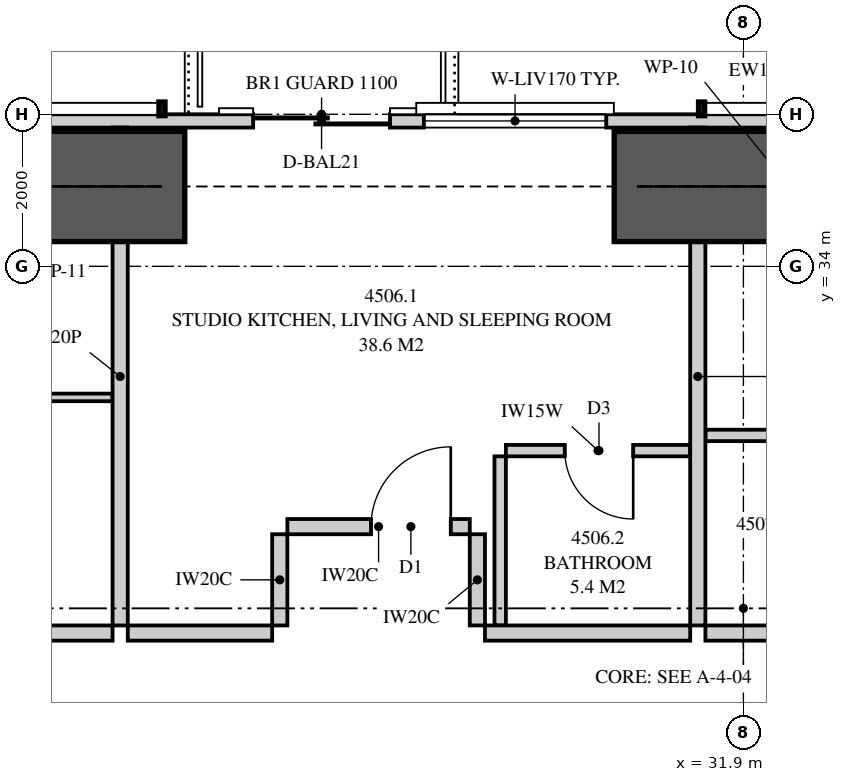
"""IFC4 building model, lengths in metres.
Left out: names, types, materials, properties, quantities, classifications, styles, units other than length and angle.
Written with IfcOpenShell. Run it as: python <this file> out.ifc"""

import sys

from ifc_helpers import new_model, si_unit, direction, frame, frame_2d, origin, place, context, subcontext, project, spatial, polyline, rectangle, outline, extrude, element, fill, save


model = new_model("IFC4")
c1 = context("Model", 3, precision=1e-05, world=origin(), true_north=direction((0.0, 1.0)))
c2 = subcontext(c1, "Body", "Model", "MODEL_VIEW")
j1 = project(units=[si_unit("LENGTHUNIT", "METRE"), si_unit("PLANEANGLEUNIT", "RADIAN")], contexts=[c1])
p1 = place(None, origin())
s1 = spatial("IfcSite", under=j1, at=p1, CompositionType="ELEMENT")
p2 = place(p1, origin())
s2 = spatial("IfcBuilding", under=s1, at=p2, CompositionType="ELEMENT")
p3 = place(p2, frame((0.0, 0.0, 167.75)))
s3 = spatial("IfcBuildingStorey", under=s2, at=p3, CompositionType="ELEMENT", Elevation=167.75)
p4 = place(p3, frame((49.949, 35.913, 0.0), z_axis=(0.0, 0.0, 1.0), x_axis=(-1.0, 0.0, 0.0)))
e1 = element("IfcWall", 1, at=p4, inside=s3, PredefinedType="SOLIDWALL", context=c2, shape_type="SweptSolid", body=[
    extrude(outline(polyline([(0.0, 0.0), (34.897, 0.0), (34.897, 3.11), (27.91, 3.11), (27.91, 2.15), (27.836, 2.15), (27.836, 3.11), (27.699, 3.11), (27.699, 2.15), (7.199, 2.15), (7.199, 3.11), (7.062, 3.11), (7.062, 2.15), (6.987, 2.15), (6.987, 3.11), (0.0, 3.11), (0.0, 0.0)])), frame((0.0, 0.087, 0.0), z_axis=(0.0, -1.0, 0.0), x_axis=(1.0, 0.0, 0.0)), (0.0, 0.0, 1.0), 0.175),
])
p5 = place(p4, frame((2.149, 0.0, 0.4)))
e2 = element("IfcOpeningElement", 2, at=p5, cuts=e1, PredefinedType="OPENING", context=c2, shape_type="SweptSolid", body=[
    extrude(rectangle(XDim=1.8, YDim=1.7, at=frame_2d((0.9, 0.85))), frame((0.0, 0.097, 0.0), z_axis=(0.0, -1.0, 0.0), x_axis=(1.0, 0.0, 0.0)), (0.0, 0.0, 1.0), 0.195),
])
p6 = place(p4, frame((10.299, 0.0, 0.0)))
e3 = element("IfcOpeningElement", 3, at=p6, cuts=e1, PredefinedType="OPENING", context=c2, shape_type="SweptSolid", body=[
    extrude(rectangle(XDim=1.8, YDim=2.1, at=frame_2d((0.9, 1.05))), frame((0.0, 0.097, 0.0), z_axis=(0.0, -1.0, 0.0), x_axis=(1.0, 0.0, 0.0)), (0.0, 0.0, 1.0), 0.195),
])
p7 = place(p4, frame((13.231, 0.0, 0.4)))
e4 = element("IfcOpeningElement", 4, at=p7, cuts=e1, PredefinedType="OPENING", context=c2, shape_type="SweptSolid", body=[
    extrude(rectangle(XDim=1.8, YDim=1.7, at=frame_2d((0.9, 0.85))), frame((0.0, 0.097, 0.0), z_axis=(0.0, -1.0, 0.0), x_axis=(1.0, 0.0, 0.0)), (0.0, 0.0, 1.0), 0.195),
])
p8 = place(p4, frame((22.699, 0.0, 0.0)))
e5 = element("IfcOpeningElement", 5, at=p8, cuts=e1, PredefinedType="OPENING", context=c2, shape_type="SweptSolid", body=[
    extrude(rectangle(XDim=1.8, YDim=2.1, at=frame_2d((0.9, 1.05))), frame((0.0, 0.097, 0.0), z_axis=(0.0, -1.0, 0.0), x_axis=(1.0, 0.0, 0.0)), (0.0, 0.0, 1.0), 0.195),
])
p9 = place(p4, frame((19.853, 0.0, 0.4)))
e6 = element("IfcOpeningElement", 6, at=p9, cuts=e1, PredefinedType="OPENING", context=c2, shape_type="SweptSolid", body=[
    extrude(rectangle(XDim=2.4, YDim=1.7, at=frame_2d((1.2, 0.85))), frame((0.0, 0.097, 0.0), z_axis=(0.0, -1.0, 0.0), x_axis=(1.0, 0.0, 0.0)), (0.0, 0.0, 1.0), 0.195),
])
p10 = place(p4, frame((30.104, 0.0, 0.4)))
e7 = element("IfcOpeningElement", 7, at=p10, cuts=e1, PredefinedType="OPENING", context=c2, shape_type="SweptSolid", body=[
    extrude(rectangle(XDim=2.4, YDim=1.7, at=frame_2d((1.2, 0.85))), frame((0.0, 0.097, 0.0), z_axis=(0.0, -1.0, 0.0), x_axis=(1.0, 0.0, 0.0)), (0.0, 0.0, 1.0), 0.195),
])
p11 = place(p3, frame((23.7, 35.825, 0.0), z_axis=(0.0, 0.0, 1.0), x_axis=(0.0, -1.0, 0.0)))
e8 = element("IfcWall", 8, at=p11, inside=s3, PredefinedType="PARTITIONING", context=c2, shape_type="SweptSolid", body=[
    extrude(outline(polyline([(0.529, 2.15), (0.0, 2.15), (0.0, 0.0), (0.529, 0.0), (0.529, 0.332), (1.021, 0.332), (1.021, 0.0), (6.55, 0.0), (6.55, 3.11), (1.685, 3.11), (1.685, 2.15), (1.021, 2.15), (1.021, 1.818), (0.529, 1.818), (0.529, 2.15)])), frame((0.0, 0.1, 0.0), z_axis=(0.0, -1.0, 0.0), x_axis=(1.0, 0.0, 0.0)), (0.0, 0.0, 1.0), 0.2),
])
p12 = place(p3, frame((17.85, 29.175, 0.0), z_axis=(0.0, 0.0, 1.0), x_axis=(1.0, 0.0, 0.0)))
e9 = element("IfcWall", 9, at=p12, inside=s3, PredefinedType="PARTITIONING", context=c2, shape_type="SweptSolid", body=[
    extrude(outline(polyline([(0.0, 0.0), (5.75, 0.0), (5.75, 3.11), (4.737, 3.11), (4.737, 2.541), (4.062, 2.541), (4.062, 3.11), (0.0, 3.11), (0.0, 0.0)])), frame((0.0, 0.1, 0.0), z_axis=(0.0, -1.0, 0.0), x_axis=(1.0, 0.0, 0.0)), (0.0, 0.0, 1.0), 0.2),
])
p13 = place(p12, frame((2.35, 0.0, 0.0)))
e10 = element("IfcOpeningElement", 10, at=p13, cuts=e9, PredefinedType="OPENING", context=c2, shape_type="SweptSolid", body=[
    extrude(rectangle(XDim=1.05, YDim=2.2, at=frame_2d((0.525, 1.1))), frame((0.0, 0.11, 0.0), z_axis=(0.0, -1.0, 0.0), x_axis=(1.0, 0.0, 0.0)), (0.0, 0.0, 1.0), 0.22),
])
p14 = place(p3, frame((20.05, 32.275, 0.0), z_axis=(0.0, 0.0, 1.0), x_axis=(1.0, 0.0, 0.0)))
e11 = element("IfcWall", 11, at=p14, inside=s3, PredefinedType="PARTITIONING", context=c2, shape_type="SweptSolid", body=[
    extrude(outline(polyline([(0.0, 0.0), (3.55, 0.0), (3.55, 3.11), (2.487, 3.11), (2.487, 2.541), (1.913, 2.541), (1.913, 3.11), (0.0, 3.11), (0.0, 0.0)])), frame((0.0, 0.05, 0.0), z_axis=(0.0, -1.0, 0.0), x_axis=(1.0, 0.0, 0.0)), (0.0, 0.0, 1.0), 0.1),
])
p15 = place(p14, frame((1.3, 0.0, 0.0)))
e12 = element("IfcOpeningElement", 12, at=p15, cuts=e11, PredefinedType="OPENING", context=c2, shape_type="SweptSolid", body=[
    extrude(rectangle(XDim=0.9, YDim=2.1, at=frame_2d((0.45, 1.05))), frame((0.0, 0.06, 0.0), z_axis=(0.0, -1.0, 0.0), x_axis=(1.0, 0.0, 0.0)), (0.0, 0.0, 1.0), 0.12),
])
p16 = place(p3, frame((31.3, 35.825, 0.0), z_axis=(0.0, 0.0, 1.0), x_axis=(0.0, -1.0, 0.0)))
e13 = element("IfcWall", 13, at=p16, inside=s3, PredefinedType="PARTITIONING", context=c2, shape_type="SweptSolid", body=[
    extrude(outline(polyline([(0.529, 2.15), (0.0, 2.15), (0.0, 0.0), (0.529, 0.0), (0.529, 0.542), (1.021, 0.542), (1.021, 0.0), (6.55, 0.0), (6.55, 3.11), (1.685, 3.11), (1.685, 2.15), (1.021, 2.15), (1.021, 1.609), (0.529, 1.609), (0.529, 2.15)])), frame((0.0, 0.1, 0.0), z_axis=(0.0, -1.0, 0.0), x_axis=(1.0, 0.0, 0.0)), (0.0, 0.0, 1.0), 0.2),
])
p17 = place(p3, frame((23.8, 29.175, 0.0), z_axis=(0.0, 0.0, 1.0), x_axis=(1.0, 0.0, 0.0)))
e14 = element("IfcWall", 14, at=p17, inside=s3, PredefinedType="PARTITIONING", context=c2, shape_type="SweptSolid", body=[
    extrude(rectangle(XDim=1.9, YDim=0.2, at=frame_2d((0.95, 0.0))), origin(), (0.0, 0.0, 1.0), 3.11),
])
p18 = place(p3, frame((28.775, 31.575, 0.0), z_axis=(0.0, 0.0, 1.0), x_axis=(1.0, 0.0, 0.0)))
e15 = element("IfcWall", 15, at=p18, inside=s3, PredefinedType="PLUMBINGWALL", context=c2, shape_type="SweptSolid", body=[
    extrude(rectangle(XDim=2.425, YDim=0.15, at=frame_2d((1.212, 0.0))), origin(), (0.0, 0.0, 1.0), 3.11),
])
p19 = place(p18, frame((0.775, 0.0, 0.0)))
e16 = element("IfcOpeningElement", 16, at=p19, cuts=e15, PredefinedType="OPENING", context=c2, shape_type="SweptSolid", body=[
    extrude(rectangle(XDim=0.9, YDim=2.1, at=frame_2d((0.45, 1.05))), frame((0.0, 0.085, 0.0), z_axis=(0.0, -1.0, 0.0), x_axis=(1.0, 0.0, 0.0)), (0.0, 0.0, 1.0), 0.17),
])
p20 = place(p3, frame((28.7, 31.5, 0.0), z_axis=(0.0, 0.0, 1.0), x_axis=(0.0, -1.0, 0.0)))
e17 = element("IfcWall", 17, at=p20, inside=s3, PredefinedType="PLUMBINGWALL", context=c2, shape_type="SweptSolid", body=[
    extrude(rectangle(XDim=2.225, YDim=0.15, at=frame_2d((1.113, 0.0))), origin(), (0.0, 0.0, 1.0), 3.11),
])
p21 = place(p3, frame((31.4, 29.175, 0.0), z_axis=(0.0, 0.0, 1.0), x_axis=(1.0, 0.0, 0.0)))
e18 = element("IfcWall", 18, at=p21, inside=s3, PredefinedType="PARTITIONING", context=c2, shape_type="SweptSolid", body=[
    extrude(outline(polyline([(0.0, 0.0), (9.55, 0.0), (9.55, 3.11), (1.437, 3.11), (1.437, 2.541), (0.763, 2.541), (0.763, 3.11), (0.0, 3.11), (0.0, 0.0)])), frame((0.0, 0.1, 0.0), z_axis=(0.0, -1.0, 0.0), x_axis=(1.0, 0.0, 0.0)), (0.0, 0.0, 1.0), 0.2),
])
p22 = place(p3, frame((31.4, 31.775, 0.0), z_axis=(0.0, 0.0, 1.0), x_axis=(1.0, 0.0, 0.0)))
e19 = element("IfcWall", 19, at=p22, inside=s3, PredefinedType="PLUMBINGWALL", context=c2, shape_type="SweptSolid", body=[
    extrude(outline(polyline([(0.0, 0.0), (5.75, 0.0), (5.75, 3.11), (1.412, 3.11), (1.412, 2.541), (0.788, 2.541), (0.788, 3.11), (0.0, 3.11), (0.0, 0.0)])), frame((0.0, 0.075, 0.0), z_axis=(0.0, -1.0, 0.0), x_axis=(1.0, 0.0, 0.0)), (0.0, 0.0, 1.0), 0.15),
])
p23 = place(p22, frame((4.45, 0.0, 0.0)))
e20 = element("IfcOpeningElement", 20, at=p23, cuts=e19, PredefinedType="OPENING", context=c2, shape_type="SweptSolid", body=[
    extrude(rectangle(XDim=0.9, YDim=2.1, at=frame_2d((0.45, 1.05))), frame((0.0, 0.085, 0.0), z_axis=(0.0, -1.0, 0.0), x_axis=(1.0, 0.0, 0.0)), (0.0, 0.0, 1.0), 0.17),
])
p24 = place(p3, frame((28.5, 29.175, 0.0), z_axis=(0.0, 0.0, 1.0), x_axis=(1.0, 0.0, 0.0)))
e21 = element("IfcWall", 21, at=p24, inside=s3, PredefinedType="PARTITIONING", context=c2, shape_type="SweptSolid", body=[
    extrude(rectangle(XDim=2.7, YDim=0.2, at=frame_2d((1.35, 0.0))), origin(), (0.0, 0.0, 1.0), 3.11),
])
p25 = place(p3, frame((25.9, 30.575, 0.0), z_axis=(0.0, 0.0, 1.0), x_axis=(1.0, 0.0, 0.0)))
e22 = element("IfcWall", 22, at=p25, inside=s3, PredefinedType="PARTITIONING", context=c2, shape_type="SweptSolid", body=[
    extrude(rectangle(XDim=2.4, YDim=0.2, at=frame_2d((1.2, 0.0))), origin(), (0.0, 0.0, 1.0), 3.11),
])
p26 = place(p25, frame((1.1, 0.0, 0.0)))
e23 = element("IfcOpeningElement", 23, at=p26, cuts=e22, PredefinedType="OPENING", context=c2, shape_type="SweptSolid", body=[
    extrude(rectangle(XDim=1.05, YDim=2.2, at=frame_2d((0.525, 1.1))), frame((0.0, 0.11, 0.0), z_axis=(0.0, -1.0, 0.0), x_axis=(1.0, 0.0, 0.0)), (0.0, 0.0, 1.0), 0.22),
])
for number, where, z_axis, x_axis in (
    (24, (25.8, 29.275, 0.0), (0.0, 0.0, 1.0), (0.0, 1.0, 0.0)),
    (25, (28.4, 29.275, 0.0), (0.0, 0.0, 1.0), (0.0, 1.0, 0.0)),
):
    element("IfcWall", number, at=place(p3, frame(where, z_axis=z_axis, x_axis=x_axis)), inside=s3, PredefinedType="PARTITIONING", context=c2, shape_type="SweptSolid", body=[
        extrude(rectangle(XDim=1.2, YDim=0.2, at=frame_2d((0.6, 0.0))), origin(), (0.0, 0.0, 1.0), 3.11),
    ])
for number, where, z_axis, x_axis in (
    (26, (30.2, 35.05, 0.0), (0.0, 0.0, 1.0), (1.0, 0.0, 0.0)),
    (27, (19.95, 35.05, 0.0), (0.0, 0.0, 1.0), (1.0, 0.0, 0.0)),
):
    element("IfcWall", number, at=place(p3, frame(where, z_axis=z_axis, x_axis=x_axis)), inside=s3, PredefinedType="SHEAR", context=c2, shape_type="SweptSolid", body=[
        extrude(rectangle(XDim=4.6, YDim=1.45, at=frame_2d((2.3, 0.0))), origin(), (0.0, 0.0, 1.0), 3.35),
    ])
p27 = place(p8, origin())
e28 = element("IfcDoor", 28, at=p27, inside=s3, OperationType="SLIDING_TO_LEFT", PredefinedType="DOOR", context=c2, shape_type="SweptSolid", body=[
    extrude(rectangle(XDim=1.8, YDim=2.1, at=frame_2d((0.9, 1.05))), frame((0.0, 0.025, 0.0), z_axis=(0.0, -1.0, 0.0), x_axis=(1.0, 0.0, 0.0)), (0.0, 0.0, 1.0), 0.05),
])
fill(e5, e28)
p28 = place(p9, origin())
e29 = element("IfcWindow", 29, at=p28, inside=s3, PartitioningType="SINGLE_PANEL", PredefinedType="WINDOW", context=c2, shape_type="SweptSolid", body=[
    extrude(rectangle(XDim=2.4, YDim=1.7, at=frame_2d((1.2, 0.85))), frame((0.0, 0.03, 0.0), z_axis=(0.0, -1.0, 0.0), x_axis=(1.0, 0.0, 0.0)), (0.0, 0.0, 1.0), 0.06),
])
fill(e6, e29)
p29 = place(p26, origin())
e30 = element("IfcDoor", 30, at=p29, inside=s3, OperationType="SINGLE_SWING_RIGHT", PredefinedType="DOOR", context=c2, shape_type="SweptSolid", body=[
    extrude(rectangle(XDim=1.05, YDim=2.2, at=frame_2d((0.525, 1.1))), frame((0.0, 0.025, 0.0), z_axis=(0.0, -1.0, 0.0), x_axis=(1.0, 0.0, 0.0)), (0.0, 0.0, 1.0), 0.05),
])
fill(e23, e30)
p30 = place(p19, frame((0.9, 0.0, 0.0), z_axis=(0.0, 0.0, 1.0), x_axis=(-1.0, 0.0, 0.0)))
e31 = element("IfcDoor", 31, at=p30, inside=s3, OperationType="SINGLE_SWING_LEFT", PredefinedType="DOOR", context=c2, shape_type="SweptSolid", body=[
    extrude(rectangle(XDim=0.9, YDim=2.1, at=frame_2d((0.45, 1.05))), frame((0.0, 0.025, 0.0), z_axis=(0.0, -1.0, 0.0), x_axis=(1.0, 0.0, 0.0)), (0.0, 0.0, 1.0), 0.05),
])
fill(e16, e31)
save(model, sys.argv[1])
